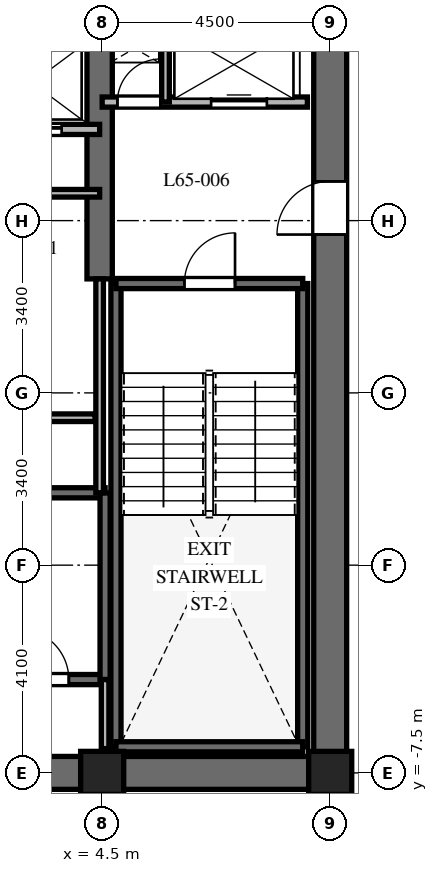
"""IFC4 building model, lengths in metres.
Left out: names, types, materials, properties, quantities, classifications, styles, units other than length and angle.
Written with IfcOpenShell. Run it as: python <this file> out.ifc"""

import sys

from ifc_helpers import new_model, si_unit, direction, frame, frame_2d, origin, origin_2d, place, context, subcontext, project, spatial, rectangle, extrude, element, fill, save


model = new_model("IFC4")
c1 = context("Model", 3, precision=1e-05, world=origin(), true_north=direction((0.0, 1.0)))
c2 = subcontext(c1, "Body", "Model", "MODEL_VIEW")
j1 = project(units=[si_unit("LENGTHUNIT", "METRE"), si_unit("PLANEANGLEUNIT", "RADIAN")], contexts=[c1])
p1 = place(None, origin())
s1 = spatial("IfcSite", under=j1, at=p1, CompositionType="ELEMENT")
p2 = place(p1, origin())
s2 = spatial("IfcBuilding", under=s1, at=p2, CompositionType="ELEMENT")
p3 = place(p2, frame((0.0, 0.0, 261.3)))
s3 = spatial("IfcBuildingStorey", under=s2, at=p3, CompositionType="ELEMENT", Elevation=261.3)
p4 = place(p3, frame((-9.325, -7.5, 0.0), z_axis=(0.0, 0.0, 1.0), x_axis=(1.0, 0.0, 0.0)))
e1 = element("IfcWall", 1, at=p4, inside=s3, PredefinedType="SHEAR", context=c2, shape_type="SweptSolid", body=[
    extrude(rectangle(XDim=18.65, YDim=0.65, at=frame_2d((9.325, 0.0))), origin(), (0.0, 0.0, 1.0), 3.9),
])
p5 = place(p4, frame((9.375, 0.0, 0.0)))
e2 = element("IfcOpeningElement", 2, at=p5, cuts=e1, PredefinedType="OPENING", context=c2, shape_type="SweptSolid", body=[
    extrude(rectangle(XDim=1.0, YDim=2.15, at=frame_2d((0.5, 1.075))), frame((0.0, 0.335, 0.0), z_axis=(0.0, -1.0, 0.0), x_axis=(1.0, 0.0, 0.0)), (0.0, 0.0, 1.0), 0.67),
])
p6 = place(p3, frame((9.0, -7.175, 0.0), z_axis=(0.0, 0.0, 1.0), x_axis=(0.0, 1.0, 0.0)))
e3 = element("IfcWall", 3, at=p6, inside=s3, PredefinedType="SHEAR", context=c2, shape_type="SweptSolid", body=[
    extrude(rectangle(XDim=14.35, YDim=0.65, at=frame_2d((7.175, 0.0))), origin(), (0.0, 0.0, 1.0), 3.9),
])
p7 = place(p6, frame((10.3, 0.0, 0.0)))
e4 = element("IfcOpeningElement", 4, at=p7, cuts=e3, PredefinedType="OPENING", context=c2, shape_type="SweptSolid", body=[
    extrude(rectangle(XDim=1.05, YDim=2.15, at=frame_2d((0.525, 1.075))), frame((0.0, 0.335, 0.0), z_axis=(0.0, -1.0, 0.0), x_axis=(1.0, 0.0, 0.0)), (0.0, 0.0, 1.0), 0.67),
])
p8 = place(p3, frame((4.45, 2.25, 0.0), z_axis=(0.0, 0.0, 1.0), x_axis=(0.0, 1.0, 0.0)))
e5 = element("IfcWall", 5, at=p8, inside=s3, PredefinedType="SHEAR", context=c2, shape_type="SweptSolid", body=[
    extrude(rectangle(XDim=4.925, YDim=0.5, at=frame_2d((2.462, 0.0))), origin(), (0.0, 0.0, 1.0), 3.9),
])
for number, where, z_axis, x_axis in (
    (6, (4.772, -6.985, 0.0), (0.0, 0.0, 1.0), (0.0, 1.0, 0.0)),
    (7, (8.458, -6.985, 0.0), (0.0, 0.0, 1.0), (0.0, 1.0, 0.0)),
):
    element("IfcWall", number, at=place(p3, frame(where, z_axis=z_axis, x_axis=x_axis)), inside=s3, PredefinedType="SHEAR", context=c2, shape_type="SweptSolid", body=[
        extrude(rectangle(XDim=9.143, YDim=0.2, at=frame_2d((4.572, 0.0))), origin(), (0.0, 0.0, 1.0), 3.9),
    ])
p9 = place(p3, frame((4.772, -6.985, 0.0), z_axis=(0.0, 0.0, 1.0), x_axis=(1.0, 0.0, 0.0)))
e8 = element("IfcWall", 8, at=p9, inside=s3, PredefinedType="SHEAR", context=c2, shape_type="SweptSolid", body=[
    extrude(rectangle(XDim=3.686, YDim=0.2, at=frame_2d((1.843, 0.0))), origin(), (0.0, 0.0, 1.0), 3.9),
])
p10 = place(p3, frame((4.772, 2.158, 0.0), z_axis=(0.0, 0.0, 1.0), x_axis=(1.0, 0.0, 0.0)))
e9 = element("IfcWall", 9, at=p10, inside=s3, PredefinedType="SHEAR", context=c2, shape_type="SweptSolid", body=[
    extrude(rectangle(XDim=3.686, YDim=0.2, at=frame_2d((1.843, 0.0))), origin(), (0.0, 0.0, 1.0), 3.9),
])
p11 = place(p10, frame((1.35, 0.0, 0.0)))
e10 = element("IfcOpeningElement", 10, at=p11, cuts=e9, PredefinedType="OPENING", context=c2, shape_type="SweptSolid", body=[
    extrude(rectangle(XDim=1.0, YDim=2.15, at=frame_2d((0.5, 1.075))), frame((0.0, 0.11, 0.0), z_axis=(0.0, -1.0, 0.0), x_axis=(1.0, 0.0, 0.0)), (0.0, 0.0, 1.0), 0.22),
])
p12 = place(p3, frame((-4.608, -5.658, 0.0), z_axis=(0.0, 0.0, 1.0), x_axis=(1.0, 0.0, 0.0)))
e11 = element("IfcWall", 11, at=p12, inside=s3, PredefinedType="SHEAR", context=c2, shape_type="SweptSolid", body=[
    extrude(rectangle(XDim=9.166, YDim=0.2, at=frame_2d((4.583, 0.0))), origin(), (0.0, 0.0, 1.0), 3.9),
])
p13 = place(p12, frame((7.45, 0.0, 0.0)))
e12 = element("IfcOpeningElement", 12, at=p13, cuts=e11, PredefinedType="OPENING", context=c2, shape_type="SweptSolid", body=[
    extrude(rectangle(XDim=1.0, YDim=2.15, at=frame_2d((0.5, 1.075))), frame((0.0, 0.11, 0.0), z_axis=(0.0, -1.0, 0.0), x_axis=(1.0, 0.0, 0.0)), (0.0, 0.0, 1.0), 0.22),
])
p14 = place(p3, frame((-4.608, -1.972, 0.0), z_axis=(0.0, 0.0, 1.0), x_axis=(1.0, 0.0, 0.0)))
e13 = element("IfcWall", 13, at=p14, inside=s3, PredefinedType="SHEAR", context=c2, shape_type="SweptSolid", body=[
    extrude(rectangle(XDim=9.166, YDim=0.2, at=frame_2d((4.583, 0.0))), origin(), (0.0, 0.0, 1.0), 3.9),
])
p15 = place(p3, frame((4.558, -5.658, 0.0), z_axis=(0.0, 0.0, 1.0), x_axis=(0.0, 1.0, 0.0)))
e14 = element("IfcWall", 14, at=p15, inside=s3, PredefinedType="SHEAR", context=c2, shape_type="SweptSolid", body=[
    extrude(rectangle(XDim=3.686, YDim=0.2, at=frame_2d((1.843, 0.0))), origin(), (0.0, 0.0, 1.0), 3.9),
])
for number, where, z_axis, x_axis in (
    (15, (4.5, -7.5, 0.0), (0.0, 0.0, 1.0), (1.0, 0.0, 0.0)),
    (16, (9.0, -7.5, 0.0), (0.0, 0.0, 1.0), (1.0, 0.0, 0.0)),
):
    element("IfcColumn", number, at=place(p3, frame(where, z_axis=z_axis, x_axis=x_axis)), inside=s3, PredefinedType="COLUMN", context=c2, shape_type="SweptSolid", body=[
        extrude(rectangle(XDim=0.85, YDim=0.85, at=origin_2d()), origin(), (0.0, 0.0, 1.0), 3.9),
    ])
p16 = place(p3, frame((4.558, -7.02, 0.0), z_axis=(0.0, 0.0, 1.0), x_axis=(0.0, 1.0, 0.0)))
e17 = element("IfcWall", 17, at=p16, inside=s3, PredefinedType="PARTITIONING", context=c2, shape_type="SweptSolid", body=[
    extrude(rectangle(XDim=1.362, YDim=0.15, at=frame_2d((0.681, 0.0))), origin(), (0.0, 0.0, 1.0), 3.6),
])
p17 = place(p3, frame((4.5, 5.74, 0.0), z_axis=(0.0, 0.0, 1.0), x_axis=(1.0, 0.0, 0.0)))
e18 = element("IfcWall", 18, at=p17, inside=s3, PredefinedType="PARTITIONING", context=c2, shape_type="SweptSolid", body=[
    extrude(rectangle(XDim=4.05, YDim=0.2, at=frame_2d((2.025, 0.0))), origin(), (0.0, 0.0, 1.0), 3.6),
])
p18 = place(p17, frame((0.3, 0.0, 0.0)))
e19 = element("IfcOpeningElement", 19, at=p18, cuts=e18, PredefinedType="OPENING", context=c2, shape_type="SweptSolid", body=[
    extrude(rectangle(XDim=0.85, YDim=2.03, at=frame_2d((0.425, 1.015))), frame((0.0, 0.11, 0.0), z_axis=(0.0, -1.0, 0.0), x_axis=(1.0, 0.0, 0.0)), (0.0, 0.0, 1.0), 0.22),
])
p19 = place(p17, frame((2.15, 0.0, 0.0)))
e20 = element("IfcOpeningElement", 20, at=p19, cuts=e18, PredefinedType="OPENING", context=c2, shape_type="SweptSolid", body=[
    extrude(rectangle(XDim=1.1, YDim=2.2, at=frame_2d((0.55, 1.1))), frame((0.0, 0.11, 0.0), z_axis=(0.0, -1.0, 0.0), x_axis=(1.0, 0.0, 0.0)), (0.0, 0.0, 1.0), 0.22),
])
p20 = place(p3, frame((5.75, 5.74, 0.0), z_axis=(0.0, 0.0, 1.0), x_axis=(0.0, 1.0, 0.0)))
e21 = element("IfcWall", 21, at=p20, inside=s3, PredefinedType="PARTITIONING", context=c2, shape_type="SweptSolid", body=[
    extrude(rectangle(XDim=1.41, YDim=0.15, at=frame_2d((0.705, 0.0))), origin(), (0.0, 0.0, 1.0), 3.6),
])
p21 = place(p3, frame((1.85, 5.2, 0.0), z_axis=(0.0, 0.0, 1.0), x_axis=(1.0, 0.0, 0.0)))
e22 = element("IfcWall", 22, at=p21, inside=s3, PredefinedType="PARTITIONING", context=c2, shape_type="SweptSolid", body=[
    extrude(rectangle(XDim=2.6, YDim=0.2, at=frame_2d((1.3, 0.0))), origin(), (0.0, 0.0, 1.0), 3.6),
])
p22 = place(p21, frame((0.75, 0.0, 0.0)))
e23 = element("IfcOpeningElement", 23, at=p22, cuts=e22, PredefinedType="OPENING", context=c2, shape_type="SweptSolid", body=[
    extrude(rectangle(XDim=1.1, YDim=2.2, at=frame_2d((0.55, 1.1))), frame((0.0, 0.11, 0.0), z_axis=(0.0, -1.0, 0.0), x_axis=(1.0, 0.0, 0.0)), (0.0, 0.0, 1.0), 0.22),
])
p23 = place(p3, frame((4.45, -1.972, 0.0), z_axis=(0.0, 0.0, 1.0), x_axis=(0.0, 1.0, 0.0)))
e24 = element("IfcWall", 24, at=p23, inside=s3, PredefinedType="PARTITIONING", context=c2, shape_type="SweptSolid", body=[
    extrude(rectangle(XDim=4.222, YDim=0.15, at=frame_2d((2.111, 0.0))), origin(), (0.0, 0.0, 1.0), 3.6),
])
p24 = place(p3, frame((1.9, 3.94, 0.0), z_axis=(0.0, 0.0, 1.0), x_axis=(1.0, 0.0, 0.0)))
e25 = element("IfcWall", 25, at=p24, inside=s3, PredefinedType="PARTITIONING", context=c2, shape_type="SweptSolid", body=[
    extrude(rectangle(XDim=2.55, YDim=0.15, at=frame_2d((1.275, 0.0))), origin(), (0.0, 0.0, 1.0), 3.6),
])
p25 = place(p3, frame((-4.36, -0.49, 0.0), z_axis=(0.0, 0.0, 1.0), x_axis=(1.0, 0.0, 0.0)))
e26 = element("IfcWall", 26, at=p25, inside=s3, PredefinedType="PARTITIONING", context=c2, shape_type="SweptSolid", body=[
    extrude(rectangle(XDim=8.72, YDim=0.15, at=frame_2d((4.36, 0.0))), origin(), (0.0, 0.0, 1.0), 3.6),
])
p26 = place(p25, frame((2.81, 0.0, 0.0)))
e27 = element("IfcOpeningElement", 27, at=p26, cuts=e26, PredefinedType="OPENING", context=c2, shape_type="SweptSolid", body=[
    extrude(rectangle(XDim=0.85, YDim=2.03, at=frame_2d((0.425, 1.015))), frame((0.0, 0.085, 0.0), z_axis=(0.0, -1.0, 0.0), x_axis=(1.0, 0.0, 0.0)), (0.0, 0.0, 1.0), 0.17),
])
p27 = place(p25, frame((4.61, 0.0, 0.0)))
e28 = element("IfcOpeningElement", 28, at=p27, cuts=e26, PredefinedType="OPENING", context=c2, shape_type="SweptSolid", body=[
    extrude(rectangle(XDim=0.85, YDim=2.03, at=frame_2d((0.425, 1.015))), frame((0.0, 0.085, 0.0), z_axis=(0.0, -1.0, 0.0), x_axis=(1.0, 0.0, 0.0)), (0.0, 0.0, 1.0), 0.17),
])
p28 = place(p11, origin())
e29 = element("IfcDoor", 29, at=p28, inside=s3, OperationType="SINGLE_SWING_RIGHT", PredefinedType="DOOR", context=c2, shape_type="SweptSolid", body=[
    extrude(rectangle(XDim=1.0, YDim=2.15, at=frame_2d((0.5, 1.075))), frame((0.0, 0.025, 0.0), z_axis=(0.0, -1.0, 0.0), x_axis=(1.0, 0.0, 0.0)), (0.0, 0.0, 1.0), 0.05),
])
fill(e10, e29)
p29 = place(p13, origin())
e30 = element("IfcDoor", 30, at=p29, inside=s3, OperationType="SINGLE_SWING_LEFT", PredefinedType="DOOR", context=c2, shape_type="SweptSolid", body=[
    extrude(rectangle(XDim=1.0, YDim=2.15, at=frame_2d((0.5, 1.075))), frame((0.0, 0.025, 0.0), z_axis=(0.0, -1.0, 0.0), x_axis=(1.0, 0.0, 0.0)), (0.0, 0.0, 1.0), 0.05),
])
fill(e12, e30)
p30 = place(p7, origin())
e31 = element("IfcDoor", 31, at=p30, inside=s3, OperationType="SINGLE_SWING_LEFT", PredefinedType="DOOR", context=c2, shape_type="SweptSolid", body=[
    extrude(rectangle(XDim=1.05, YDim=2.15, at=frame_2d((0.525, 1.075))), frame((0.0, 0.025, 0.0), z_axis=(0.0, -1.0, 0.0), x_axis=(1.0, 0.0, 0.0)), (0.0, 0.0, 1.0), 0.05),
])
fill(e4, e31)
p31 = place(p18, origin())
e32 = element("IfcDoor", 32, at=p31, inside=s3, OperationType="SINGLE_SWING_RIGHT", PredefinedType="DOOR", context=c2, shape_type="SweptSolid", body=[
    extrude(rectangle(XDim=0.85, YDim=2.03, at=frame_2d((0.425, 1.015))), frame((0.0, 0.025, 0.0), z_axis=(0.0, -1.0, 0.0), x_axis=(1.0, 0.0, 0.0)), (0.0, 0.0, 1.0), 0.05),
])
fill(e19, e32)
p32 = place(p19, origin())
e33 = element("IfcDoor", 33, at=p32, inside=s3, OperationType="SLIDING_TO_RIGHT", PredefinedType="DOOR", context=c2, shape_type="SweptSolid", body=[
    extrude(rectangle(XDim=1.1, YDim=2.2, at=frame_2d((0.55, 1.1))), frame((0.0, 0.025, 0.0), z_axis=(0.0, -1.0, 0.0), x_axis=(1.0, 0.0, 0.0)), (0.0, 0.0, 1.0), 0.05),
])
fill(e20, e33)
p33 = place(p22, origin())
e34 = element("IfcDoor", 34, at=p33, inside=s3, OperationType="SLIDING_TO_RIGHT", PredefinedType="DOOR", context=c2, shape_type="SweptSolid", body=[
    extrude(rectangle(XDim=1.1, YDim=2.2, at=frame_2d((0.55, 1.1))), frame((0.0, 0.025, 0.0), z_axis=(0.0, -1.0, 0.0), x_axis=(1.0, 0.0, 0.0)), (0.0, 0.0, 1.0), 0.05),
])
fill(e23, e34)
save(model, sys.argv[1])
